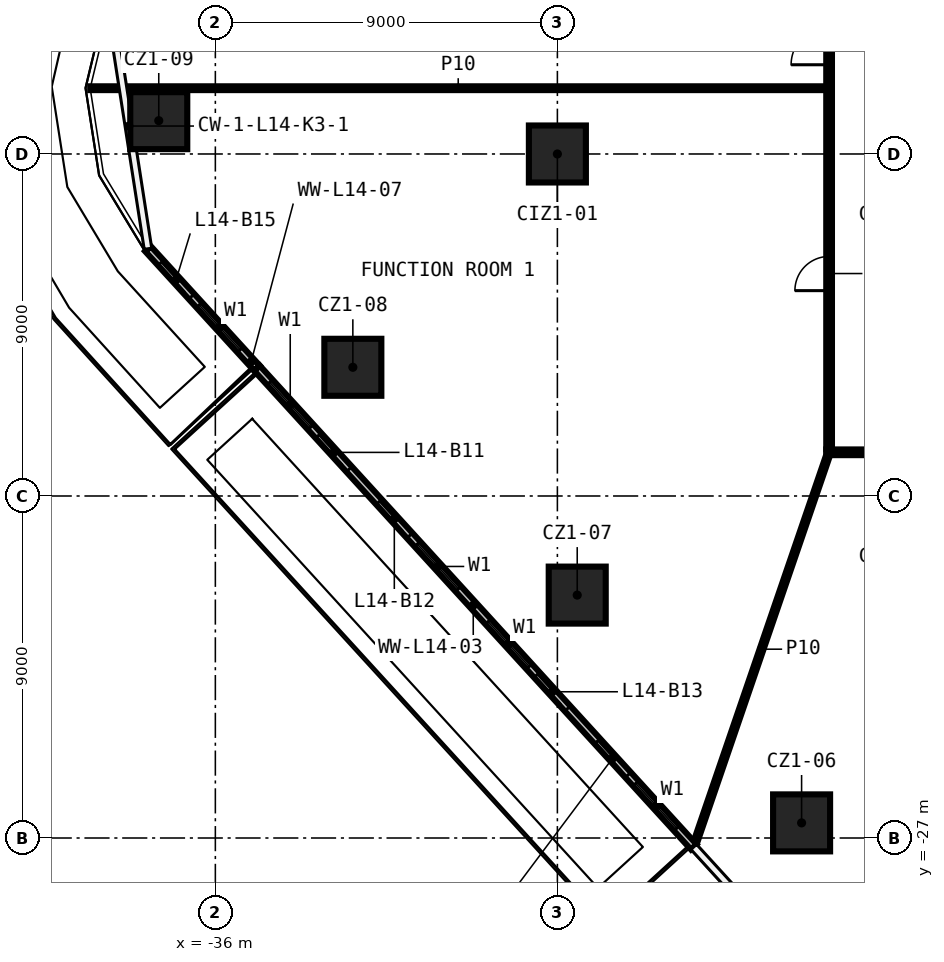
"""IFC4 building model, lengths in metres.
Left out: names, types, materials, properties, quantities, classifications, styles, units other than length and angle.
Written with IfcOpenShell. Run it as: python <this file> out.ifc"""

import sys

from ifc_helpers import new_model, si_unit, direction, frame, frame_2d, origin, origin_2d, place, context, subcontext, project, spatial, rectangle, extrude, element, fill, save


model = new_model("IFC4")
c1 = context("Model", 3, precision=1e-05, world=origin(), true_north=direction((0.0, 1.0)))
c2 = subcontext(c1, "Body", "Model", "MODEL_VIEW")
j1 = project(units=[si_unit("LENGTHUNIT", "METRE"), si_unit("PLANEANGLEUNIT", "RADIAN")], contexts=[c1])
p1 = place(None, origin())
s1 = spatial("IfcSite", under=j1, at=p1, CompositionType="ELEMENT")
p2 = place(p1, origin())
s2 = spatial("IfcBuilding", under=s1, at=p2, CompositionType="ELEMENT")
p3 = place(p2, frame((0.0, 0.0, 73.6)))
s3 = spatial("IfcBuildingStorey", under=s2, at=p3, CompositionType="ELEMENT", Elevation=73.6)
for number, where, z_axis, x_axis in (
    (1, (-20.574, -26.602, 0.0), (0.0, 0.0, 1.0), (1.0, 0.0, 0.0)),
    (2, (-26.478, -20.608, 0.0), (0.0, 0.0, 1.0), (1.0, 0.0, 0.0)),
    (3, (-32.382, -14.613, 0.0), (0.0, 0.0, 1.0), (1.0, 0.0, 0.0)),
    (4, (-37.489, -8.123, 0.0), (0.0, 0.0, 1.0), (1.0, 0.0, 0.0)),
    (5, (-27.0, -9.0, 0.0), (0.0, 0.0, 1.0), (1.0, 0.0, 0.0)),
):
    element("IfcColumn", number, at=place(p3, frame(where, z_axis=z_axis, x_axis=x_axis)), inside=s3, PredefinedType="COLUMN", context=c2, shape_type="SweptSolid", body=[
        extrude(rectangle(XDim=1.5, YDim=1.5, at=origin_2d()), origin(), (0.0, 0.0, 1.0), 3.3),
    ])
p4 = place(p3, frame((19.925, -16.85, 0.0), z_axis=(0.0, 0.0, 1.0), x_axis=(-1.0, 0.0, 0.0)))
e6 = element("IfcWall", 6, at=p4, inside=s3, PredefinedType="PARTITIONING", context=c2, shape_type="SweptSolid", body=[
    extrude(rectangle(XDim=39.85, YDim=0.15, at=frame_2d((19.925, 0.0))), origin(), (0.0, 0.0, 1.0), 3.3),
])
p5 = place(p4, frame((30.959, 0.0, 0.0)))
e7 = element("IfcOpeningElement", 7, at=p5, cuts=e6, PredefinedType="OPENING", context=c2, shape_type="SweptSolid", body=[
    extrude(rectangle(XDim=0.9, YDim=2.1, at=frame_2d((0.45, 1.05))), frame((0.0, 0.085, 0.0), z_axis=(0.0, -1.0, 0.0), x_axis=(1.0, 0.0, 0.0)), (0.0, 0.0, 1.0), 0.17),
])
p6 = place(p4, frame((22.077, 0.0, 0.0)))
e8 = element("IfcOpeningElement", 8, at=p6, cuts=e6, PredefinedType="OPENING", context=c2, shape_type="SweptSolid", body=[
    extrude(rectangle(XDim=0.9, YDim=2.1, at=frame_2d((0.45, 1.05))), frame((0.0, 0.085, 0.0), z_axis=(0.0, -1.0, 0.0), x_axis=(1.0, 0.0, 0.0)), (0.0, 0.0, 1.0), 0.17),
])
p7 = place(p3, frame((-39.293, -7.269, 0.0), z_axis=(0.0, 0.0, 1.0), x_axis=(1.0, 0.0, 0.0)))
e9 = element("IfcWall", 9, at=p7, inside=s3, PredefinedType="PARTITIONING", context=c2, shape_type="SweptSolid", body=[
    extrude(rectangle(XDim=19.368, YDim=0.1, at=frame_2d((9.684, 0.0))), origin(), (0.0, 0.0, 1.0), 3.3),
])
p8 = place(p3, frame((-23.404, -27.213, 0.0), z_axis=(0.0, 0.0, 1.0), x_axis=(0.32441263541, 0.945915663253, 0.0)))
e10 = element("IfcWall", 10, at=p8, inside=s3, PredefinedType="PARTITIONING", context=c2, shape_type="SweptSolid", body=[
    extrude(rectangle(XDim=10.955, YDim=0.1, at=frame_2d((5.478, 0.0))), origin(), (0.0, 0.0, 1.0), 3.3),
])
p9 = place(p3, frame((-19.85, -16.775, 0.0), z_axis=(0.0, 0.0, 1.0), x_axis=(0.0, 1.0, 0.0)))
e11 = element("IfcWall", 11, at=p9, inside=s3, PredefinedType="PARTITIONING", context=c2, shape_type="SweptSolid", body=[
    extrude(rectangle(XDim=33.55, YDim=0.15, at=frame_2d((16.775, 0.0))), origin(), (0.0, 0.0, 1.0), 3.3),
])
p10 = place(p9, frame((10.123, 0.0, 0.0)))
e12 = element("IfcOpeningElement", 12, at=p10, cuts=e11, PredefinedType="OPENING", context=c2, shape_type="SweptSolid", body=[
    extrude(rectangle(XDim=1.0, YDim=2.1, at=frame_2d((0.5, 1.05))), frame((0.0, 0.085, 0.0), z_axis=(0.0, -1.0, 0.0), x_axis=(1.0, 0.0, 0.0)), (0.0, 0.0, 1.0), 0.17),
])
p11 = place(p9, frame((4.179, 0.0, 0.0)))
e13 = element("IfcOpeningElement", 13, at=p11, cuts=e11, PredefinedType="OPENING", context=c2, shape_type="SweptSolid", body=[
    extrude(rectangle(XDim=0.9, YDim=2.1, at=frame_2d((0.45, 1.05))), frame((0.0, 0.085, 0.0), z_axis=(0.0, -1.0, 0.0), x_axis=(1.0, 0.0, 0.0)), (0.0, 0.0, 1.0), 0.17),
])
p12 = place(p9, frame((27.651, 0.0, 0.0)))
e14 = element("IfcOpeningElement", 14, at=p12, cuts=e11, PredefinedType="OPENING", context=c2, shape_type="SweptSolid", body=[
    extrude(rectangle(XDim=1.0, YDim=2.1, at=frame_2d((0.5, 1.05))), frame((0.0, 0.085, 0.0), z_axis=(0.0, -1.0, 0.0), x_axis=(1.0, 0.0, 0.0)), (0.0, 0.0, 1.0), 0.17),
])
p13 = place(p9, frame((20.601, 0.0, 0.0)))
e15 = element("IfcOpeningElement", 15, at=p13, cuts=e11, PredefinedType="OPENING", context=c2, shape_type="SweptSolid", body=[
    extrude(rectangle(XDim=1.0, YDim=2.1, at=frame_2d((0.5, 1.05))), frame((0.0, 0.085, 0.0), z_axis=(0.0, -1.0, 0.0), x_axis=(1.0, 0.0, 0.0)), (0.0, 0.0, 1.0), 0.17),
])
p14 = place(p3, frame((-34.906, -14.636, 0.0), z_axis=(0.0, 0.0, 1.0), x_axis=(0.674011334321, -0.738721003632, 0.0)))
e16 = element("IfcWall", 16, at=p14, inside=s3, PredefinedType="SOLIDWALL", context=c2, shape_type="SweptSolid", body=[
    extrude(rectangle(XDim=17.053, YDim=0.2, at=frame_2d((8.527, 0.0))), origin(), (0.0, 0.0, 1.0), 3.3),
])
p15 = place(p14, frame((0.5, 0.0, 0.6)))
e17 = element("IfcOpeningElement", 17, at=p15, cuts=e16, PredefinedType="OPENING", context=c2, shape_type="SweptSolid", body=[
    extrude(rectangle(XDim=1.6, YDim=2.4, at=frame_2d((0.8, 1.2))), frame((0.0, 0.11, 0.0), z_axis=(0.0, -1.0, 0.0), x_axis=(1.0, 0.0, 0.0)), (0.0, 0.0, 1.0), 0.22),
])
p16 = place(p14, frame((2.4, 0.0, 0.0)))
e18 = element("IfcOpeningElement", 18, at=p16, cuts=e16, PredefinedType="OPENING", context=c2, shape_type="SweptSolid", body=[
    extrude(rectangle(XDim=1.2, YDim=2.4, at=frame_2d((0.6, 1.2))), frame((0.0, 0.11, 0.0), z_axis=(0.0, -1.0, 0.0), x_axis=(1.0, 0.0, 0.0)), (0.0, 0.0, 1.0), 0.22),
])
p17 = place(p14, frame((6.263, 0.0, 0.6)))
e19 = element("IfcOpeningElement", 19, at=p17, cuts=e16, PredefinedType="OPENING", context=c2, shape_type="SweptSolid", body=[
    extrude(rectangle(XDim=1.6, YDim=2.4, at=frame_2d((0.8, 1.2))), frame((0.0, 0.11, 0.0), z_axis=(0.0, -1.0, 0.0), x_axis=(1.0, 0.0, 0.0)), (0.0, 0.0, 1.0), 0.22),
])
p18 = place(p14, frame((4.763, 0.0, 0.0)))
e20 = element("IfcOpeningElement", 20, at=p18, cuts=e16, PredefinedType="OPENING", context=c2, shape_type="SweptSolid", body=[
    extrude(rectangle(XDim=1.2, YDim=2.4, at=frame_2d((0.6, 1.2))), frame((0.0, 0.11, 0.0), z_axis=(0.0, -1.0, 0.0), x_axis=(1.0, 0.0, 0.0)), (0.0, 0.0, 1.0), 0.22),
])
p19 = place(p14, frame((9.027, 0.0, 0.6)))
e21 = element("IfcOpeningElement", 21, at=p19, cuts=e16, PredefinedType="OPENING", context=c2, shape_type="SweptSolid", body=[
    extrude(rectangle(XDim=1.6, YDim=2.4, at=frame_2d((0.8, 1.2))), frame((0.0, 0.11, 0.0), z_axis=(0.0, -1.0, 0.0), x_axis=(1.0, 0.0, 0.0)), (0.0, 0.0, 1.0), 0.22),
])
p20 = place(p14, frame((10.927, 0.0, 0.0)))
e22 = element("IfcOpeningElement", 22, at=p20, cuts=e16, PredefinedType="OPENING", context=c2, shape_type="SweptSolid", body=[
    extrude(rectangle(XDim=1.2, YDim=2.4, at=frame_2d((0.6, 1.2))), frame((0.0, 0.11, 0.0), z_axis=(0.0, -1.0, 0.0), x_axis=(1.0, 0.0, 0.0)), (0.0, 0.0, 1.0), 0.22),
])
p21 = place(p14, frame((14.79, 0.0, 0.6)))
e23 = element("IfcOpeningElement", 23, at=p21, cuts=e16, PredefinedType="OPENING", context=c2, shape_type="SweptSolid", body=[
    extrude(rectangle(XDim=1.6, YDim=2.4, at=frame_2d((0.8, 1.2))), frame((0.0, 0.11, 0.0), z_axis=(0.0, -1.0, 0.0), x_axis=(1.0, 0.0, 0.0)), (0.0, 0.0, 1.0), 0.22),
])
p22 = place(p14, frame((13.29, 0.0, 0.0)))
e24 = element("IfcOpeningElement", 24, at=p22, cuts=e16, PredefinedType="OPENING", context=c2, shape_type="SweptSolid", body=[
    extrude(rectangle(XDim=1.2, YDim=2.4, at=frame_2d((0.6, 1.2))), frame((0.0, 0.11, 0.0), z_axis=(0.0, -1.0, 0.0), x_axis=(1.0, 0.0, 0.0)), (0.0, 0.0, 1.0), 0.22),
])
p23 = place(p3, frame((-37.773, -11.494, 0.0), z_axis=(0.0, 0.0, 1.0), x_axis=(0.673994410995, -0.738736444172, 0.0)))
e25 = element("IfcWall", 25, at=p23, inside=s3, PredefinedType="SOLIDWALL", context=c2, shape_type="SweptSolid", body=[
    extrude(rectangle(XDim=4.254, YDim=0.2, at=frame_2d((2.127, 0.0))), origin(), (0.0, 0.0, 1.0), 3.3),
])
p24 = place(p23, frame((2.0, 0.0, 0.6)))
e26 = element("IfcOpeningElement", 26, at=p24, cuts=e25, PredefinedType="OPENING", context=c2, shape_type="SweptSolid", body=[
    extrude(rectangle(XDim=1.6, YDim=2.4, at=frame_2d((0.8, 1.2))), frame((0.0, 0.11, 0.0), z_axis=(0.0, -1.0, 0.0), x_axis=(1.0, 0.0, 0.0)), (0.0, 0.0, 1.0), 0.22),
])
p25 = place(p23, frame((0.5, 0.0, 0.0)))
e27 = element("IfcOpeningElement", 27, at=p25, cuts=e25, PredefinedType="OPENING", context=c2, shape_type="SweptSolid", body=[
    extrude(rectangle(XDim=1.2, YDim=2.4, at=frame_2d((0.6, 1.2))), frame((0.0, 0.11, 0.0), z_axis=(0.0, -1.0, 0.0), x_axis=(1.0, 0.0, 0.0)), (0.0, 0.0, 1.0), 0.22),
])
p26 = place(p10, origin())
e28 = element("IfcDoor", 28, at=p26, inside=s3, OperationType="SINGLE_SWING_RIGHT", PredefinedType="DOOR", context=c2, shape_type="SweptSolid", body=[
    extrude(rectangle(XDim=1.0, YDim=2.1, at=frame_2d((0.5, 1.05))), frame((0.0, 0.025, 0.0), z_axis=(0.0, -1.0, 0.0), x_axis=(1.0, 0.0, 0.0)), (0.0, 0.0, 1.0), 0.05),
])
fill(e12, e28)
p27 = place(p11, origin())
e29 = element("IfcDoor", 29, at=p27, inside=s3, OperationType="SINGLE_SWING_LEFT", PredefinedType="DOOR", context=c2, shape_type="SweptSolid", body=[
    extrude(rectangle(XDim=0.9, YDim=2.1, at=frame_2d((0.45, 1.05))), frame((0.0, 0.025, 0.0), z_axis=(0.0, -1.0, 0.0), x_axis=(1.0, 0.0, 0.0)), (0.0, 0.0, 1.0), 0.05),
])
fill(e13, e29)
p28 = place(p15, origin())
e30 = element("IfcWindow", 30, at=p28, inside=s3, PartitioningType="SINGLE_PANEL", PredefinedType="WINDOW", context=c2, shape_type="SweptSolid", body=[
    extrude(rectangle(XDim=1.6, YDim=2.4, at=frame_2d((0.8, 1.2))), frame((0.0, 0.03, 0.0), z_axis=(0.0, -1.0, 0.0), x_axis=(1.0, 0.0, 0.0)), (0.0, 0.0, 1.0), 0.06),
])
fill(e17, e30)
p29 = place(p16, origin())
e31 = element("IfcDoor", 31, at=p29, inside=s3, OperationType="SLIDING_TO_LEFT", PredefinedType="DOOR", context=c2, shape_type="SweptSolid", body=[
    extrude(rectangle(XDim=1.2, YDim=2.4, at=frame_2d((0.6, 1.2))), frame((0.0, 0.025, 0.0), z_axis=(0.0, -1.0, 0.0), x_axis=(1.0, 0.0, 0.0)), (0.0, 0.0, 1.0), 0.05),
])
fill(e18, e31)
p30 = place(p17, origin())
e32 = element("IfcWindow", 32, at=p30, inside=s3, PartitioningType="SINGLE_PANEL", PredefinedType="WINDOW", context=c2, shape_type="SweptSolid", body=[
    extrude(rectangle(XDim=1.6, YDim=2.4, at=frame_2d((0.8, 1.2))), frame((0.0, 0.03, 0.0), z_axis=(0.0, -1.0, 0.0), x_axis=(1.0, 0.0, 0.0)), (0.0, 0.0, 1.0), 0.06),
])
fill(e19, e32)
p31 = place(p18, origin())
e33 = element("IfcDoor", 33, at=p31, inside=s3, OperationType="SLIDING_TO_LEFT", PredefinedType="DOOR", context=c2, shape_type="SweptSolid", body=[
    extrude(rectangle(XDim=1.2, YDim=2.4, at=frame_2d((0.6, 1.2))), frame((0.0, 0.025, 0.0), z_axis=(0.0, -1.0, 0.0), x_axis=(1.0, 0.0, 0.0)), (0.0, 0.0, 1.0), 0.05),
])
fill(e20, e33)
p32 = place(p19, origin())
e34 = element("IfcWindow", 34, at=p32, inside=s3, PartitioningType="SINGLE_PANEL", PredefinedType="WINDOW", context=c2, shape_type="SweptSolid", body=[
    extrude(rectangle(XDim=1.6, YDim=2.4, at=frame_2d((0.8, 1.2))), frame((0.0, 0.03, 0.0), z_axis=(0.0, -1.0, 0.0), x_axis=(1.0, 0.0, 0.0)), (0.0, 0.0, 1.0), 0.06),
])
fill(e21, e34)
p33 = place(p20, origin())
e35 = element("IfcDoor", 35, at=p33, inside=s3, OperationType="SLIDING_TO_LEFT", PredefinedType="DOOR", context=c2, shape_type="SweptSolid", body=[
    extrude(rectangle(XDim=1.2, YDim=2.4, at=frame_2d((0.6, 1.2))), frame((0.0, 0.025, 0.0), z_axis=(0.0, -1.0, 0.0), x_axis=(1.0, 0.0, 0.0)), (0.0, 0.0, 1.0), 0.05),
])
fill(e22, e35)
p34 = place(p21, origin())
e36 = element("IfcWindow", 36, at=p34, inside=s3, PartitioningType="SINGLE_PANEL", PredefinedType="WINDOW", context=c2, shape_type="SweptSolid", body=[
    extrude(rectangle(XDim=1.6, YDim=2.4, at=frame_2d((0.8, 1.2))), frame((0.0, 0.03, 0.0), z_axis=(0.0, -1.0, 0.0), x_axis=(1.0, 0.0, 0.0)), (0.0, 0.0, 1.0), 0.06),
])
fill(e23, e36)
p35 = place(p22, origin())
e37 = element("IfcDoor", 37, at=p35, inside=s3, OperationType="SLIDING_TO_LEFT", PredefinedType="DOOR", context=c2, shape_type="SweptSolid", body=[
    extrude(rectangle(XDim=1.2, YDim=2.4, at=frame_2d((0.6, 1.2))), frame((0.0, 0.025, 0.0), z_axis=(0.0, -1.0, 0.0), x_axis=(1.0, 0.0, 0.0)), (0.0, 0.0, 1.0), 0.05),
])
fill(e24, e37)
p36 = place(p24, origin())
e38 = element("IfcWindow", 38, at=p36, inside=s3, PartitioningType="SINGLE_PANEL", PredefinedType="WINDOW", context=c2, shape_type="SweptSolid", body=[
    extrude(rectangle(XDim=1.6, YDim=2.4, at=frame_2d((0.8, 1.2))), frame((0.0, 0.03, 0.0), z_axis=(0.0, -1.0, 0.0), x_axis=(1.0, 0.0, 0.0)), (0.0, 0.0, 1.0), 0.06),
])
fill(e26, e38)
p37 = place(p25, origin())
e39 = element("IfcDoor", 39, at=p37, inside=s3, OperationType="SLIDING_TO_LEFT", PredefinedType="DOOR", context=c2, shape_type="SweptSolid", body=[
    extrude(rectangle(XDim=1.2, YDim=2.4, at=frame_2d((0.6, 1.2))), frame((0.0, 0.025, 0.0), z_axis=(0.0, -1.0, 0.0), x_axis=(1.0, 0.0, 0.0)), (0.0, 0.0, 1.0), 0.05),
])
fill(e27, e39)
save(model, sys.argv[1])
